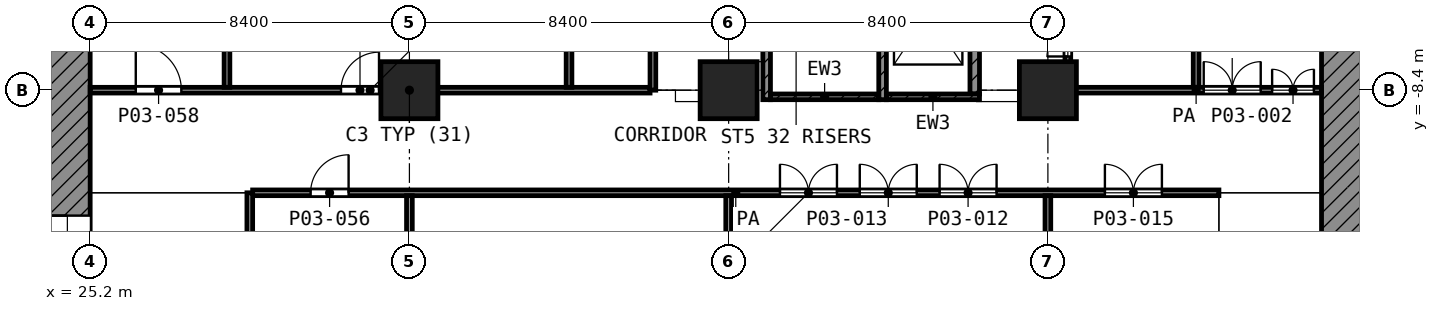
"""IFC4 building model, lengths in metres.
Left out: names, types, materials, properties, quantities, classifications, styles, units other than length and angle.
Written with IfcOpenShell. Run it as: python <this file> out.ifc"""

import sys

from ifc_helpers import new_model, si_unit, direction, frame, frame_2d, origin, origin_2d, place, context, subcontext, project, spatial, polyline, rectangle, outline, extrude, element, fill, save


model = new_model("IFC4")
c1 = context("Model", 3, precision=1e-05, world=origin(), true_north=direction((0.0, 1.0)))
c2 = subcontext(c1, "Body", "Model", "MODEL_VIEW")
j1 = project(units=[si_unit("LENGTHUNIT", "METRE"), si_unit("PLANEANGLEUNIT", "RADIAN")], contexts=[c1])
p1 = place(None, origin())
s1 = spatial("IfcSite", under=j1, at=p1, CompositionType="ELEMENT")
p2 = place(p1, origin())
s2 = spatial("IfcBuilding", under=s1, at=p2, CompositionType="ELEMENT")
p3 = place(p2, frame((0.0, 0.0, 12.6)))
s3 = spatial("IfcBuildingStorey", under=s2, at=p3, CompositionType="ELEMENT", Elevation=12.6)
for number, where, z_axis, x_axis in (
    (1, (33.6, -8.4, 0.0), (0.0, 0.0, 1.0), (1.0, 0.0, 0.0)),
    (2, (42.0, -8.4, 0.0), (0.0, 0.0, 1.0), (1.0, 0.0, 0.0)),
    (3, (50.4, -8.4, 0.0), (0.0, 0.0, 1.0), (1.0, 0.0, 0.0)),
):
    element("IfcColumn", number, at=place(p3, frame(where, z_axis=z_axis, x_axis=x_axis)), inside=s3, PredefinedType="COLUMN", context=c2, shape_type="SweptSolid", body=[
        extrude(rectangle(XDim=1.5, YDim=1.5, at=origin_2d()), origin(), (0.0, 0.0, 1.0), 5.6),
    ])
p4 = place(p3, frame((0.0, 0.0, -12.6), z_axis=(0.0, -1.0, 0.0), x_axis=(1.0, 0.0, 0.0)))
e4 = element("IfcWall", 4, at=p4, inside=s3, PredefinedType="SHEAR", context=c2, shape_type="SweptSolid", body=[
    extrude(outline(polyline([(62.938, 18.2), (62.484, 17.583), (61.414, 15.591), (60.634, 13.468), (60.448, 12.6), (57.6, 12.6), (57.6, 18.2), (62.938, 18.2)])), origin(), (0.0, 0.0, 1.0), 33.6),
])
p5 = place(p3, frame((24.6, -24.0, 0.0), z_axis=(0.0, 0.0, 1.0), x_axis=(0.0, 1.0, 0.0)))
e5 = element("IfcWall", 5, at=p5, inside=s3, PredefinedType="SHEAR", context=c2, shape_type="SweptSolid", body=[
    extrude(rectangle(XDim=18.6, YDim=1.2, at=frame_2d((9.3, 0.0))), origin(), (0.0, 0.0, 1.0), 5.25),
])
p6 = place(p5, frame((10.5, 0.0, 0.0)))
e6 = element("IfcOpeningElement", 6, at=p6, cuts=e5, PredefinedType="OPENING", context=c2, shape_type="SweptSolid", body=[
    extrude(rectangle(XDim=1.8, YDim=2.1, at=frame_2d((0.9, 1.05))), frame((0.0, 0.61, 0.0), z_axis=(0.0, -1.0, 0.0), x_axis=(1.0, 0.0, 0.0)), (0.0, 0.0, 1.0), 1.22),
])
p7 = place(p3, frame((43.0, -8.65, 0.0), z_axis=(0.0, 0.0, 1.0), x_axis=(0.0, 1.0, 0.0)))
e7 = element("IfcWall", 7, at=p7, inside=s3, PredefinedType="SHEAR", context=c2, shape_type="SweptSolid", body=[
    extrude(rectangle(XDim=8.35, YDim=0.2, at=frame_2d((4.175, 0.0))), origin(), (0.0, 0.0, 1.0), 5.25),
])
p8 = place(p7, frame((7.0, 0.0, 0.0)))
e8 = element("IfcOpeningElement", 8, at=p8, cuts=e7, PredefinedType="OPENING", context=c2, shape_type="SweptSolid", body=[
    extrude(rectangle(XDim=1.1, YDim=2.1, at=frame_2d((0.55, 1.05))), frame((0.0, 0.11, 0.0), z_axis=(0.0, -1.0, 0.0), x_axis=(1.0, 0.0, 0.0)), (0.0, 0.0, 1.0), 0.22),
])
p9 = place(p3, frame((46.05, -8.65, 0.0), z_axis=(0.0, 0.0, 1.0), x_axis=(0.0, 1.0, 0.0)))
e9 = element("IfcWall", 9, at=p9, inside=s3, PredefinedType="SHEAR", context=c2, shape_type="SweptSolid", body=[
    extrude(rectangle(XDim=8.35, YDim=0.2, at=frame_2d((4.175, 0.0))), origin(), (0.0, 0.0, 1.0), 5.25),
])
p10 = place(p9, frame((7.0, 0.0, 0.0)))
e10 = element("IfcOpeningElement", 10, at=p10, cuts=e9, PredefinedType="OPENING", context=c2, shape_type="SweptSolid", body=[
    extrude(rectangle(XDim=1.1, YDim=2.1, at=frame_2d((0.55, 1.05))), frame((0.0, 0.11, 0.0), z_axis=(0.0, -1.0, 0.0), x_axis=(1.0, 0.0, 0.0)), (0.0, 0.0, 1.0), 0.22),
])
p11 = place(p3, frame((43.1, -8.575, 0.0), z_axis=(0.0, 0.0, 1.0), x_axis=(1.0, 0.0, 0.0)))
e11 = element("IfcWall", 11, at=p11, inside=s3, PredefinedType="SHEAR", context=c2, shape_type="SweptSolid", body=[
    extrude(rectangle(XDim=2.85, YDim=0.15, at=frame_2d((1.425, 0.0))), origin(), (0.0, 0.0, 1.0), 5.25),
])
p12 = place(p3, frame((46.15, -8.575, 0.0), z_axis=(0.0, 0.0, 1.0), x_axis=(1.0, 0.0, 0.0)))
e12 = element("IfcWall", 12, at=p12, inside=s3, PredefinedType="SHEAR", context=c2, shape_type="SweptSolid", body=[
    extrude(rectangle(XDim=2.45, YDim=0.15, at=frame_2d((1.225, 0.0))), origin(), (0.0, 0.0, 1.0), 5.25),
])
p13 = place(p3, frame((48.475, -8.5, 0.0), z_axis=(0.0, 0.0, 1.0), x_axis=(0.0, 1.0, 0.0)))
e13 = element("IfcWall", 13, at=p13, inside=s3, PredefinedType="SHEAR", context=c2, shape_type="SweptSolid", body=[
    extrude(rectangle(XDim=3.475, YDim=0.25, at=frame_2d((1.738, 0.0))), origin(), (0.0, 0.0, 1.0), 5.25),
])
p14 = place(p3, frame((29.475, -11.1, 0.0), z_axis=(0.0, 0.0, 1.0), x_axis=(1.0, 0.0, 0.0)))
e14 = element("IfcWall", 14, at=p14, inside=s3, PredefinedType="PARTITIONING", context=c2, shape_type="SweptSolid", body=[
    extrude(rectangle(XDim=25.425, YDim=0.15, at=frame_2d((12.712, 0.0))), origin(), (0.0, 0.0, 1.0), 5.25),
])
p15 = place(p14, frame((18.075, 0.0, 0.0)))
e15 = element("IfcOpeningElement", 15, at=p15, cuts=e14, PredefinedType="OPENING", context=c2, shape_type="SweptSolid", body=[
    extrude(rectangle(XDim=1.5, YDim=2.1, at=frame_2d((0.75, 1.05))), frame((0.0, 0.085, 0.0), z_axis=(0.0, -1.0, 0.0), x_axis=(1.0, 0.0, 0.0)), (0.0, 0.0, 1.0), 0.17),
])
p16 = place(p14, frame((15.975, 0.0, 0.0)))
e16 = element("IfcOpeningElement", 16, at=p16, cuts=e14, PredefinedType="OPENING", context=c2, shape_type="SweptSolid", body=[
    extrude(rectangle(XDim=1.5, YDim=2.1, at=frame_2d((0.75, 1.05))), frame((0.0, 0.085, 0.0), z_axis=(0.0, -1.0, 0.0), x_axis=(1.0, 0.0, 0.0)), (0.0, 0.0, 1.0), 0.17),
])
p17 = place(p14, frame((13.875, 0.0, 0.0)))
e17 = element("IfcOpeningElement", 17, at=p17, cuts=e14, PredefinedType="OPENING", context=c2, shape_type="SweptSolid", body=[
    extrude(rectangle(XDim=1.5, YDim=2.1, at=frame_2d((0.75, 1.05))), frame((0.0, 0.085, 0.0), z_axis=(0.0, -1.0, 0.0), x_axis=(1.0, 0.0, 0.0)), (0.0, 0.0, 1.0), 0.17),
])
p18 = place(p14, frame((22.425, 0.0, 0.0)))
e18 = element("IfcOpeningElement", 18, at=p18, cuts=e14, PredefinedType="OPENING", context=c2, shape_type="SweptSolid", body=[
    extrude(rectangle(XDim=1.5, YDim=2.1, at=frame_2d((0.75, 1.05))), frame((0.0, 0.085, 0.0), z_axis=(0.0, -1.0, 0.0), x_axis=(1.0, 0.0, 0.0)), (0.0, 0.0, 1.0), 0.17),
])
p19 = place(p14, frame((1.525, 0.0, 0.0)))
e19 = element("IfcOpeningElement", 19, at=p19, cuts=e14, PredefinedType="OPENING", context=c2, shape_type="SweptSolid", body=[
    extrude(rectangle(XDim=1.0, YDim=2.1, at=frame_2d((0.5, 1.05))), frame((0.0, 0.085, 0.0), z_axis=(0.0, -1.0, 0.0), x_axis=(1.0, 0.0, 0.0)), (0.0, 0.0, 1.0), 0.17),
])
p20 = place(p3, frame((25.2, -8.4, 0.0), z_axis=(0.0, 0.0, 1.0), x_axis=(1.0, 0.0, 0.0)))
e20 = element("IfcWall", 20, at=p20, inside=s3, PredefinedType="PARTITIONING", context=c2, shape_type="SweptSolid", body=[
    extrude(rectangle(XDim=14.732, YDim=0.15, at=frame_2d((7.366, 0.0))), origin(), (0.0, 0.0, 1.0), 5.25),
])
p21 = place(p20, frame((1.2, 0.0, 0.0)))
e21 = element("IfcOpeningElement", 21, at=p21, cuts=e20, PredefinedType="OPENING", context=c2, shape_type="SweptSolid", body=[
    extrude(rectangle(XDim=1.2, YDim=2.1, at=frame_2d((0.6, 1.05))), frame((0.0, 0.085, 0.0), z_axis=(0.0, -1.0, 0.0), x_axis=(1.0, 0.0, 0.0)), (0.0, 0.0, 1.0), 0.17),
])
p22 = place(p20, frame((6.6, 0.0, 0.0)))
e22 = element("IfcOpeningElement", 22, at=p22, cuts=e20, PredefinedType="OPENING", context=c2, shape_type="SweptSolid", body=[
    extrude(rectangle(XDim=1.0, YDim=2.1, at=frame_2d((0.5, 1.05))), frame((0.0, 0.085, 0.0), z_axis=(0.0, -1.0, 0.0), x_axis=(1.0, 0.0, 0.0)), (0.0, 0.0, 1.0), 0.17),
])
p23 = place(p3, frame((51.0, -8.4, 0.0), z_axis=(0.0, 0.0, 1.0), x_axis=(1.0, 0.0, 0.0)))
e23 = element("IfcWall", 23, at=p23, inside=s3, PredefinedType="PARTITIONING", context=c2, shape_type="SweptSolid", body=[
    extrude(rectangle(XDim=6.6, YDim=0.15, at=frame_2d((3.3, 0.0))), origin(), (0.0, 0.0, 1.0), 5.25),
])
p24 = place(p23, frame((3.5, 0.0, 0.0)))
e24 = element("IfcOpeningElement", 24, at=p24, cuts=e23, PredefinedType="OPENING", context=c2, shape_type="SweptSolid", body=[
    extrude(rectangle(XDim=1.5, YDim=2.1, at=frame_2d((0.75, 1.05))), frame((0.0, 0.085, 0.0), z_axis=(0.0, -1.0, 0.0), x_axis=(1.0, 0.0, 0.0)), (0.0, 0.0, 1.0), 0.17),
])
p25 = place(p23, frame((5.3, 0.0, 0.0)))
e25 = element("IfcOpeningElement", 25, at=p25, cuts=e23, PredefinedType="OPENING", context=c2, shape_type="SweptSolid", body=[
    extrude(rectangle(XDim=1.1, YDim=2.1, at=frame_2d((0.55, 1.05))), frame((0.0, 0.085, 0.0), z_axis=(0.0, -1.0, 0.0), x_axis=(1.0, 0.0, 0.0)), (0.0, 0.0, 1.0), 0.17),
])
p26 = place(p3, frame((28.8, -8.325, 0.0), z_axis=(0.0, 0.0, 1.0), x_axis=(0.0, 1.0, 0.0)))
e26 = element("IfcWall", 26, at=p26, inside=s3, PredefinedType="PARTITIONING", context=c2, shape_type="SweptSolid", body=[
    extrude(rectangle(XDim=8.323, YDim=0.15, at=frame_2d((4.162, 0.0))), origin(), (0.0, 0.0, 1.0), 3.85),
])
p27 = place(p3, frame((29.4, -22.425, 0.0), z_axis=(0.0, 0.0, 1.0), x_axis=(0.0, 1.0, 0.0)))
e27 = element("IfcWall", 27, at=p27, inside=s3, PredefinedType="PARTITIONING", context=c2, shape_type="SweptSolid", body=[
    extrude(rectangle(XDim=11.325, YDim=0.15, at=frame_2d((5.663, 0.0))), origin(), (0.0, 0.0, 1.0), 5.25),
])
p28 = place(p3, frame((33.6, -22.425, 0.0), z_axis=(0.0, 0.0, 1.0), x_axis=(0.0, 1.0, 0.0)))
e28 = element("IfcWall", 28, at=p28, inside=s3, PredefinedType="PARTITIONING", context=c2, shape_type="SweptSolid", body=[
    extrude(rectangle(XDim=11.25, YDim=0.15, at=frame_2d((5.625, 0.0))), origin(), (0.0, 0.0, 1.0), 5.25),
])
p29 = place(p3, frame((37.8, -8.325, 0.0), z_axis=(0.0, 0.0, 1.0), x_axis=(0.0, 1.0, 0.0)))
e29 = element("IfcWall", 29, at=p29, inside=s3, PredefinedType="PARTITIONING", context=c2, shape_type="SweptSolid", body=[
    extrude(rectangle(XDim=9.605, YDim=0.15, at=frame_2d((4.802, 0.0))), origin(), (0.0, 0.0, 1.0), 3.85),
])
p30 = place(p3, frame((40.007, -8.4, 0.0), z_axis=(0.0, 0.0, 1.0), x_axis=(0.0, 1.0, 0.0)))
e30 = element("IfcWall", 30, at=p30, inside=s3, PredefinedType="PARTITIONING", context=c2, shape_type="SweptSolid", body=[
    extrude(rectangle(XDim=7.975, YDim=0.15, at=frame_2d((3.987, 0.0))), origin(), (0.0, 0.0, 1.0), 3.85),
])
p31 = place(p30, frame((1.262, 0.0, 0.0)))
e31 = element("IfcOpeningElement", 31, at=p31, cuts=e30, PredefinedType="OPENING", context=c2, shape_type="SweptSolid", body=[
    extrude(rectangle(XDim=1.5, YDim=2.1, at=frame_2d((0.75, 1.05))), frame((0.0, 0.085, 0.0), z_axis=(0.0, -1.0, 0.0), x_axis=(1.0, 0.0, 0.0)), (0.0, 0.0, 1.0), 0.17),
])
p32 = place(p30, frame((3.274, 0.0, 0.0)))
e32 = element("IfcOpeningElement", 32, at=p32, cuts=e30, PredefinedType="OPENING", context=c2, shape_type="SweptSolid", body=[
    extrude(rectangle(XDim=1.5, YDim=2.1, at=frame_2d((0.75, 1.05))), frame((0.0, 0.085, 0.0), z_axis=(0.0, -1.0, 0.0), x_axis=(1.0, 0.0, 0.0)), (0.0, 0.0, 1.0), 0.17),
])
p33 = place(p30, frame((5.286, 0.0, 0.0)))
e33 = element("IfcOpeningElement", 33, at=p33, cuts=e30, PredefinedType="OPENING", context=c2, shape_type="SweptSolid", body=[
    extrude(rectangle(XDim=1.5, YDim=2.1, at=frame_2d((0.75, 1.05))), frame((0.0, 0.085, 0.0), z_axis=(0.0, -1.0, 0.0), x_axis=(1.0, 0.0, 0.0)), (0.0, 0.0, 1.0), 0.17),
])
for number, where, z_axis, x_axis in (
    (34, (42.0, -22.425, 0.0), (0.0, 0.0, 1.0), (0.0, 1.0, 0.0)),
    (35, (50.4, -22.425, 0.0), (0.0, 0.0, 1.0), (0.0, 1.0, 0.0)),
):
    element("IfcWall", number, at=place(p3, frame(where, z_axis=z_axis, x_axis=x_axis)), inside=s3, PredefinedType="PARTITIONING", context=c2, shape_type="SweptSolid", body=[
        extrude(rectangle(XDim=11.25, YDim=0.15, at=frame_2d((5.625, 0.0))), origin(), (0.0, 0.0, 1.0), 5.25),
    ])
p34 = place(p3, frame((50.925, -8.4, 0.0), z_axis=(0.0, 0.0, 1.0), x_axis=(0.0, 1.0, 0.0)))
e36 = element("IfcWall", 36, at=p34, inside=s3, PredefinedType="PARTITIONING", context=c2, shape_type="SweptSolid", body=[
    extrude(rectangle(XDim=6.548, YDim=0.15, at=frame_2d((3.274, 0.0))), origin(), (0.0, 0.0, 1.0), 5.25),
])
p35 = place(p34, frame((4.161, 0.0, 0.0)))
e37 = element("IfcOpeningElement", 37, at=p35, cuts=e36, PredefinedType="OPENING", context=c2, shape_type="SweptSolid", body=[
    extrude(rectangle(XDim=1.5, YDim=2.1, at=frame_2d((0.75, 1.05))), frame((0.0, 0.085, 0.0), z_axis=(0.0, -1.0, 0.0), x_axis=(1.0, 0.0, 0.0)), (0.0, 0.0, 1.0), 0.17),
])
p36 = place(p34, frame((2.324, 0.0, 0.0)))
e38 = element("IfcOpeningElement", 38, at=p36, cuts=e36, PredefinedType="OPENING", context=c2, shape_type="SweptSolid", body=[
    extrude(rectangle(XDim=1.5, YDim=2.1, at=frame_2d((0.75, 1.05))), frame((0.0, 0.085, 0.0), z_axis=(0.0, -1.0, 0.0), x_axis=(1.0, 0.0, 0.0)), (0.0, 0.0, 1.0), 0.17),
])
p37 = place(p34, frame((0.887, 0.0, 0.0)))
e39 = element("IfcOpeningElement", 39, at=p37, cuts=e36, PredefinedType="OPENING", context=c2, shape_type="SweptSolid", body=[
    extrude(rectangle(XDim=1.1, YDim=2.1, at=frame_2d((0.55, 1.05))), frame((0.0, 0.085, 0.0), z_axis=(0.0, -1.0, 0.0), x_axis=(1.0, 0.0, 0.0)), (0.0, 0.0, 1.0), 0.17),
])
p38 = place(p3, frame((54.3, -8.325, 0.0), z_axis=(0.0, 0.0, 1.0), x_axis=(0.0, 1.0, 0.0)))
e40 = element("IfcWall", 40, at=p38, inside=s3, PredefinedType="PARTITIONING", context=c2, shape_type="SweptSolid", body=[
    extrude(rectangle(XDim=9.605, YDim=0.15, at=frame_2d((4.802, 0.0))), origin(), (0.0, 0.0, 1.0), 5.25),
])
p39 = place(p6, origin())
e41 = element("IfcDoor", 41, at=p39, inside=s3, OperationType="DOUBLE_DOOR_SINGLE_SWING", PredefinedType="DOOR", context=c2, shape_type="SweptSolid", body=[
    extrude(rectangle(XDim=1.8, YDim=2.1, at=frame_2d((0.9, 1.05))), frame((0.0, 0.025, 0.0), z_axis=(0.0, -1.0, 0.0), x_axis=(1.0, 0.0, 0.0)), (0.0, 0.0, 1.0), 0.05),
])
fill(e6, e41)
p40 = place(p21, origin())
e42 = element("IfcDoor", 42, at=p40, inside=s3, OperationType="SINGLE_SWING_LEFT", PredefinedType="DOOR", context=c2, shape_type="SweptSolid", body=[
    extrude(rectangle(XDim=1.2, YDim=2.1, at=frame_2d((0.6, 1.05))), frame((0.0, 0.025, 0.0), z_axis=(0.0, -1.0, 0.0), x_axis=(1.0, 0.0, 0.0)), (0.0, 0.0, 1.0), 0.05),
])
fill(e21, e42)
p41 = place(p22, origin())
e43 = element("IfcDoor", 43, at=p41, inside=s3, OperationType="SINGLE_SWING_RIGHT", PredefinedType="DOOR", context=c2, shape_type="SweptSolid", body=[
    extrude(rectangle(XDim=1.0, YDim=2.1, at=frame_2d((0.5, 1.05))), frame((0.0, 0.025, 0.0), z_axis=(0.0, -1.0, 0.0), x_axis=(1.0, 0.0, 0.0)), (0.0, 0.0, 1.0), 0.05),
])
fill(e22, e43)
p42 = place(p37, origin())
e44 = element("IfcDoor", 44, at=p42, inside=s3, OperationType="DOUBLE_DOOR_SINGLE_SWING", PredefinedType="DOOR", context=c2, shape_type="SweptSolid", body=[
    extrude(rectangle(XDim=1.1, YDim=2.1, at=frame_2d((0.55, 1.05))), frame((0.0, 0.025, 0.0), z_axis=(0.0, -1.0, 0.0), x_axis=(1.0, 0.0, 0.0)), (0.0, 0.0, 1.0), 0.05),
])
fill(e39, e44)
p43 = place(p24, origin())
e45 = element("IfcDoor", 45, at=p43, inside=s3, OperationType="DOUBLE_DOOR_SINGLE_SWING", PredefinedType="DOOR", context=c2, shape_type="SweptSolid", body=[
    extrude(rectangle(XDim=1.5, YDim=2.1, at=frame_2d((0.75, 1.05))), frame((0.0, 0.025, 0.0), z_axis=(0.0, -1.0, 0.0), x_axis=(1.0, 0.0, 0.0)), (0.0, 0.0, 1.0), 0.05),
])
fill(e24, e45)
p44 = place(p25, origin())
e46 = element("IfcDoor", 46, at=p44, inside=s3, OperationType="DOUBLE_DOOR_SINGLE_SWING", PredefinedType="DOOR", context=c2, shape_type="SweptSolid", body=[
    extrude(rectangle(XDim=1.1, YDim=2.1, at=frame_2d((0.55, 1.05))), frame((0.0, 0.025, 0.0), z_axis=(0.0, -1.0, 0.0), x_axis=(1.0, 0.0, 0.0)), (0.0, 0.0, 1.0), 0.05),
])
fill(e25, e46)
p45 = place(p15, origin())
e47 = element("IfcDoor", 47, at=p45, inside=s3, OperationType="DOUBLE_DOOR_SINGLE_SWING", PredefinedType="DOOR", context=c2, shape_type="SweptSolid", body=[
    extrude(rectangle(XDim=1.5, YDim=2.1, at=frame_2d((0.75, 1.05))), frame((0.0, 0.025, 0.0), z_axis=(0.0, -1.0, 0.0), x_axis=(1.0, 0.0, 0.0)), (0.0, 0.0, 1.0), 0.05),
])
fill(e15, e47)
p46 = place(p16, origin())
e48 = element("IfcDoor", 48, at=p46, inside=s3, OperationType="DOUBLE_DOOR_SINGLE_SWING", PredefinedType="DOOR", context=c2, shape_type="SweptSolid", body=[
    extrude(rectangle(XDim=1.5, YDim=2.1, at=frame_2d((0.75, 1.05))), frame((0.0, 0.025, 0.0), z_axis=(0.0, -1.0, 0.0), x_axis=(1.0, 0.0, 0.0)), (0.0, 0.0, 1.0), 0.05),
])
fill(e16, e48)
p47 = place(p17, origin())
e49 = element("IfcDoor", 49, at=p47, inside=s3, OperationType="DOUBLE_DOOR_SINGLE_SWING", PredefinedType="DOOR", context=c2, shape_type="SweptSolid", body=[
    extrude(rectangle(XDim=1.5, YDim=2.1, at=frame_2d((0.75, 1.05))), frame((0.0, 0.025, 0.0), z_axis=(0.0, -1.0, 0.0), x_axis=(1.0, 0.0, 0.0)), (0.0, 0.0, 1.0), 0.05),
])
fill(e17, e49)
p48 = place(p18, origin())
e50 = element("IfcDoor", 50, at=p48, inside=s3, OperationType="DOUBLE_DOOR_SINGLE_SWING", PredefinedType="DOOR", context=c2, shape_type="SweptSolid", body=[
    extrude(rectangle(XDim=1.5, YDim=2.1, at=frame_2d((0.75, 1.05))), frame((0.0, 0.025, 0.0), z_axis=(0.0, -1.0, 0.0), x_axis=(1.0, 0.0, 0.0)), (0.0, 0.0, 1.0), 0.05),
])
fill(e18, e50)
p49 = place(p19, origin())
e51 = element("IfcDoor", 51, at=p49, inside=s3, OperationType="SINGLE_SWING_RIGHT", PredefinedType="DOOR", context=c2, shape_type="SweptSolid", body=[
    extrude(rectangle(XDim=1.0, YDim=2.1, at=frame_2d((0.5, 1.05))), frame((0.0, 0.025, 0.0), z_axis=(0.0, -1.0, 0.0), x_axis=(1.0, 0.0, 0.0)), (0.0, 0.0, 1.0), 0.05),
])
fill(e19, e51)
save(model, sys.argv[1])
